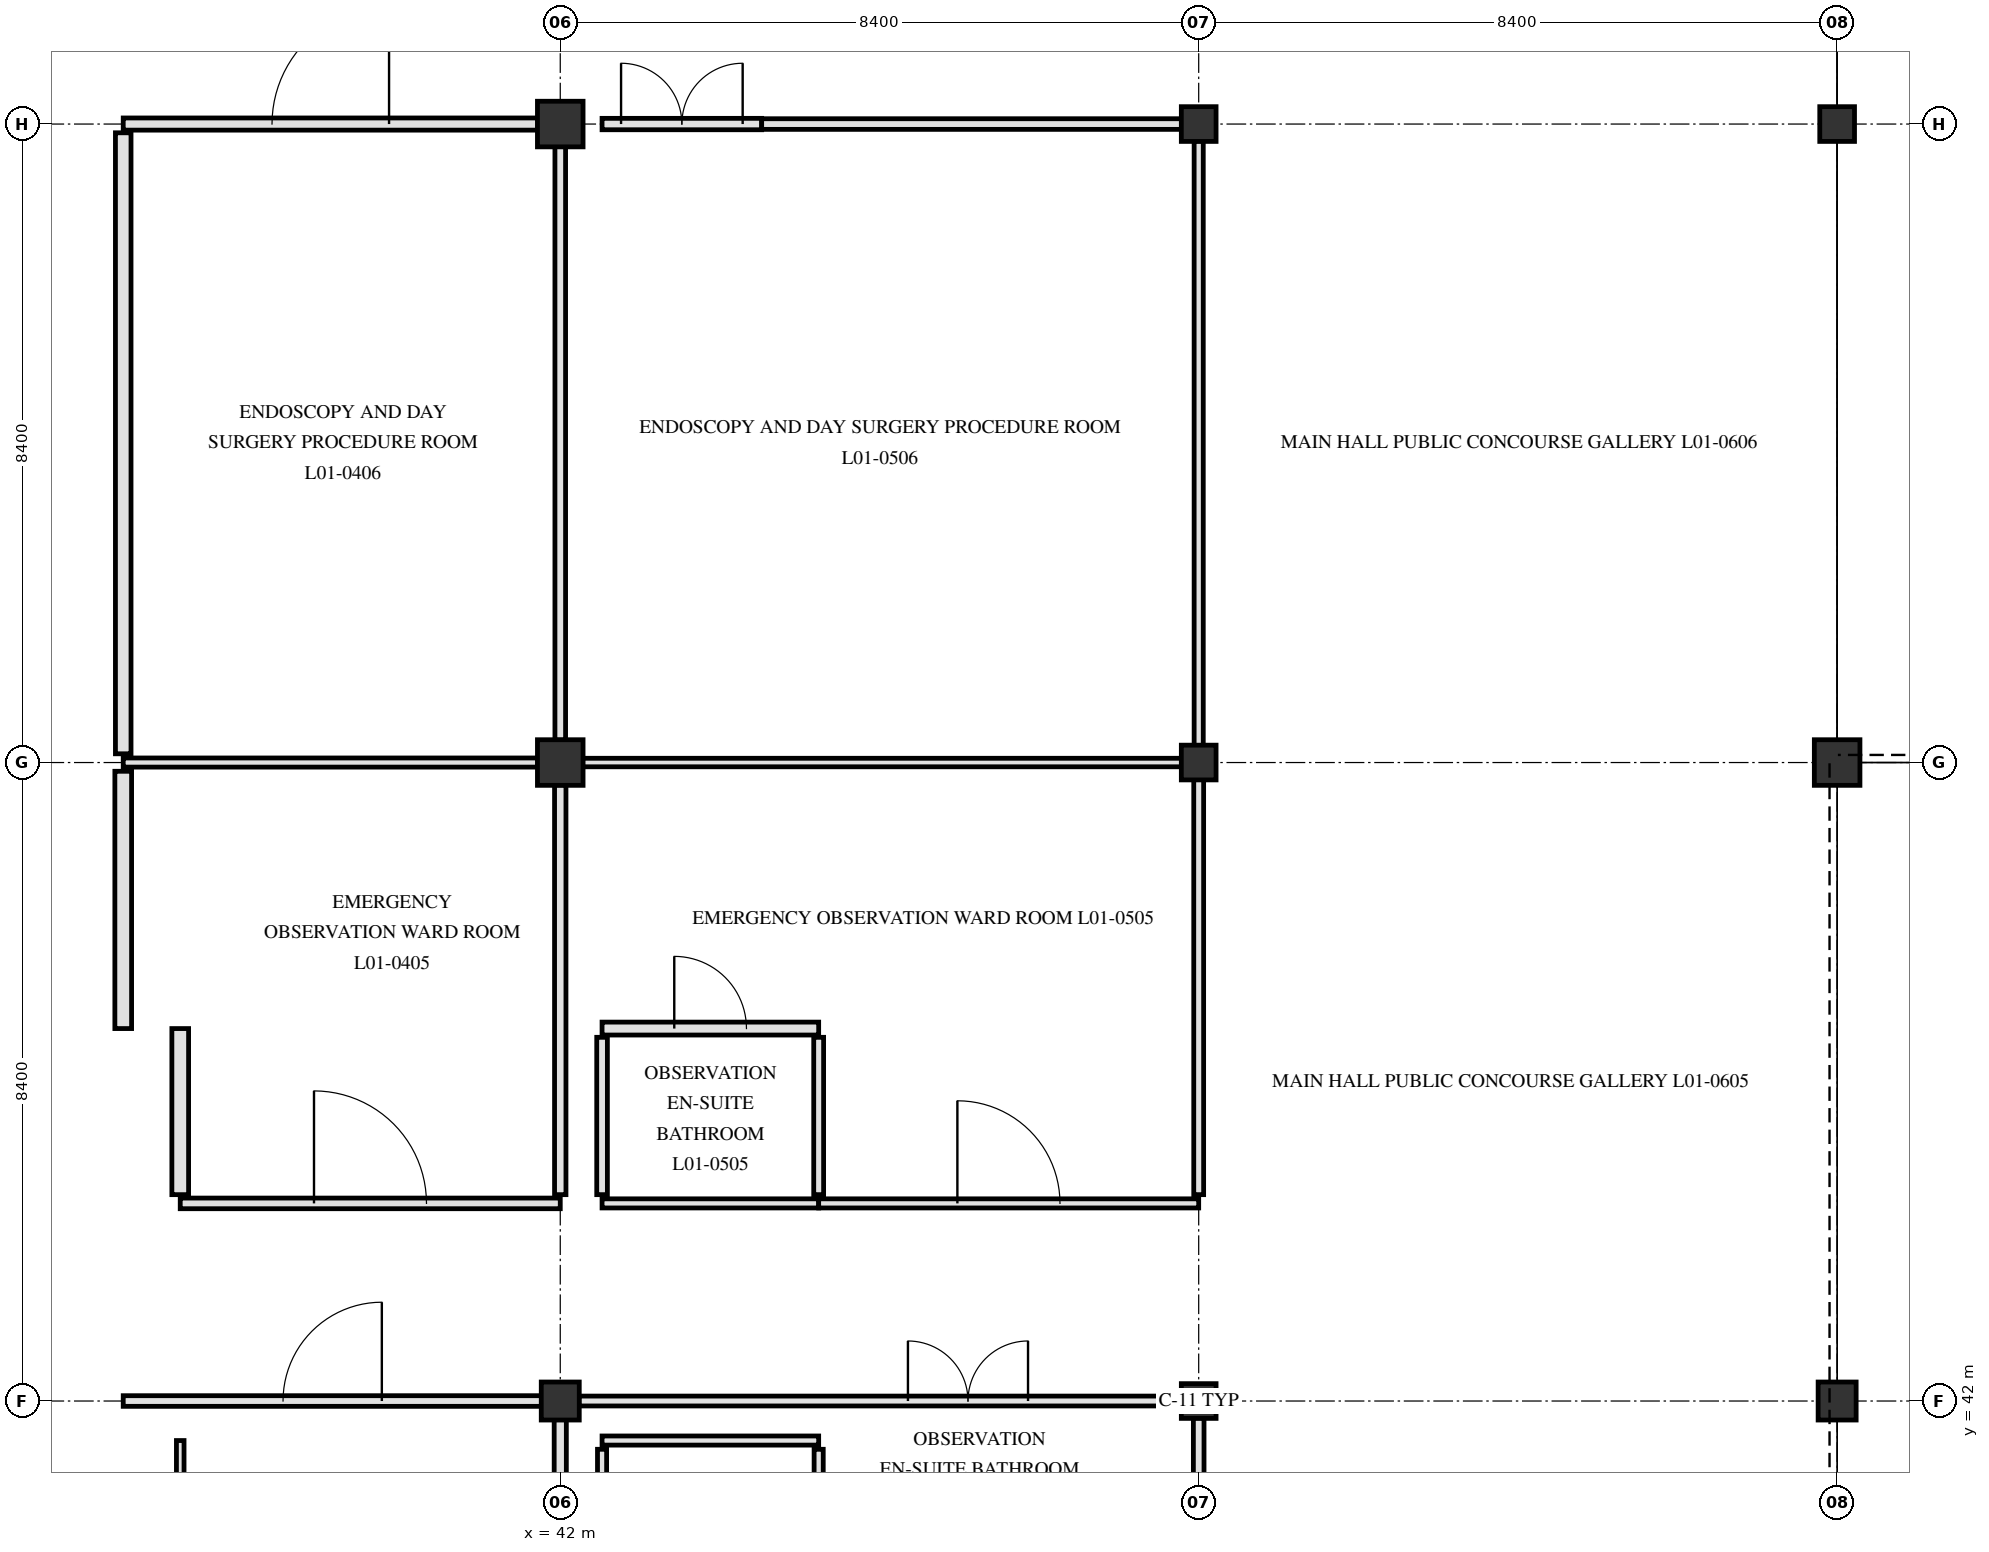
"""IFC4 building model, lengths in metres.
Left out: names, types, materials, properties, quantities, classifications, styles, units other than length and angle.
Written with IfcOpenShell. Run it as: python <this file> out.ifc"""

import sys

from ifc_helpers import new_model, si_unit, direction, frame, frame_2d, origin, origin_2d, place, context, subcontext, project, spatial, rectangle, hollow_circle, extrude, element, fill, save


model = new_model("IFC4")
c1 = context("Model", 3, precision=1e-05, world=origin(), true_north=direction((0.0, 1.0)))
c2 = subcontext(c1, "Body", "Model", "MODEL_VIEW")
j1 = project(units=[si_unit("LENGTHUNIT", "METRE"), si_unit("PLANEANGLEUNIT", "RADIAN")], contexts=[c1])
p1 = place(None, origin())
s1 = spatial("IfcSite", under=j1, at=p1, CompositionType="ELEMENT")
p2 = place(p1, origin())
s2 = spatial("IfcBuilding", under=s1, at=p2, CompositionType="ELEMENT")
p3 = place(p2, frame((0.0, 0.0, 4.8)))
s3 = spatial("IfcBuildingStorey", under=s2, at=p3, CompositionType="ELEMENT", Elevation=4.8)
p4 = place(p3, frame((42.0, 42.0, 0.0), z_axis=(0.0, 0.0, 1.0), x_axis=(1.0, 0.0, 0.0)))
e1 = element("IfcColumn", 1, at=p4, inside=s3, PredefinedType="COLUMN", context=c2, shape_type="SweptSolid", body=[
    extrude(rectangle(XDim=0.5, YDim=0.5, at=origin_2d()), origin(), (0.0, 0.0, 1.0), 4.5),
])
for number, where, z_axis, x_axis in (
    (2, (42.0, 50.4, 0.0), (0.0, 0.0, 1.0), (1.0, 0.0, 0.0)),
    (3, (42.0, 58.8, 0.0), (0.0, 0.0, 1.0), (1.0, 0.0, 0.0)),
):
    element("IfcColumn", number, at=place(p3, frame(where, z_axis=z_axis, x_axis=x_axis)), inside=s3, PredefinedType="COLUMN", context=c2, shape_type="SweptSolid", body=[
        extrude(rectangle(XDim=0.6, YDim=0.6, at=origin_2d()), origin(), (0.0, 0.0, 1.0), 4.5),
    ])
for number, where, z_axis, x_axis in (
    (4, (50.4, 42.0, 0.0), (0.0, 0.0, 1.0), (1.0, 0.0, 0.0)),
    (5, (50.4, 50.4, 0.0), (0.0, 0.0, 1.0), (1.0, 0.0, 0.0)),
    (6, (50.4, 58.8, 0.0), (0.0, 0.0, 1.0), (1.0, 0.0, 0.0)),
):
    element("IfcColumn", number, at=place(p3, frame(where, z_axis=z_axis, x_axis=x_axis)), inside=s3, PredefinedType="COLUMN", context=c2, shape_type="SweptSolid", body=[
        extrude(hollow_circle(Radius=0.229, WallThickness=0.02, at=origin_2d()), origin(), (0.0, 0.0, 1.0), 4.5),
    ])
p5 = place(p3, frame((58.8, 42.0, 0.0), z_axis=(0.0, 0.0, 1.0), x_axis=(1.0, 0.0, 0.0)))
e7 = element("IfcColumn", 7, at=p5, inside=s3, PredefinedType="COLUMN", context=c2, shape_type="SweptSolid", body=[
    extrude(rectangle(XDim=0.5, YDim=0.5, at=origin_2d()), origin(), (0.0, 0.0, 1.0), 4.5),
])
p6 = place(p3, frame((58.8, 50.4, 0.0), z_axis=(0.0, 0.0, 1.0), x_axis=(1.0, 0.0, 0.0)))
e8 = element("IfcColumn", 8, at=p6, inside=s3, PredefinedType="COLUMN", context=c2, shape_type="SweptSolid", body=[
    extrude(rectangle(XDim=0.6, YDim=0.6, at=origin_2d()), origin(), (0.0, 0.0, 1.0), 4.5),
])
p7 = place(p3, frame((58.8, 58.8, 0.0), z_axis=(0.0, 0.0, 1.0), x_axis=(1.0, 0.0, 0.0)))
e9 = element("IfcColumn", 9, at=p7, inside=s3, PredefinedType="COLUMN", context=c2, shape_type="SweptSolid", body=[
    extrude(hollow_circle(Radius=0.229, WallThickness=0.02, at=origin_2d()), origin(), (0.0, 0.0, 1.0), 4.5),
])
p8 = place(p3, frame((42.55, 41.48, 0.0), z_axis=(0.0, 0.0, 1.0), x_axis=(1.0, 0.0, 0.0)))
e10 = element("IfcWall", 10, at=p8, inside=s3, PredefinedType="PARTITIONING", context=c2, shape_type="SweptSolid", body=[
    extrude(rectangle(XDim=2.85, YDim=0.12, at=frame_2d((1.425, 0.0))), origin(), (0.0, 0.0, 1.0), 4.14),
])
p9 = place(p3, frame((36.25, 42.0, 0.0), z_axis=(0.0, 0.0, 1.0), x_axis=(1.0, 0.0, 0.0)))
e11 = element("IfcWall", 11, at=p9, inside=s3, PredefinedType="PARTITIONING", context=c2, shape_type="SweptSolid", body=[
    extrude(rectangle(XDim=5.505, YDim=0.14, at=frame_2d((2.752, 0.0))), origin(), (0.0, 0.0, 1.0), 3.54),
])
p10 = place(p9, frame((2.103, 0.0, 0.0)))
e12 = element("IfcOpeningElement", 12, at=p10, cuts=e11, PredefinedType="OPENING", context=c2, shape_type="SweptSolid", body=[
    extrude(rectangle(XDim=1.3, YDim=2.2, at=frame_2d((0.65, 1.1))), frame((0.0, 0.08, 0.0), z_axis=(0.0, -1.0, 0.0), x_axis=(1.0, 0.0, 0.0)), (0.0, 0.0, 1.0), 0.16),
])
p11 = place(p3, frame((42.245, 42.0, 0.0), z_axis=(0.0, 0.0, 1.0), x_axis=(1.0, 0.0, 0.0)))
e13 = element("IfcWall", 13, at=p11, inside=s3, PredefinedType="PARTITIONING", context=c2, shape_type="SweptSolid", body=[
    extrude(rectangle(XDim=7.931, YDim=0.13, at=frame_2d((3.966, 0.0))), origin(), (0.0, 0.0, 1.0), 3.54),
])
p12 = place(p11, frame((4.33, 0.0, 0.0)))
e14 = element("IfcOpeningElement", 14, at=p12, cuts=e13, PredefinedType="OPENING", context=c2, shape_type="SweptSolid", body=[
    extrude(rectangle(XDim=1.58, YDim=2.22, at=frame_2d((0.79, 1.11))), frame((0.0, 0.075, 0.0), z_axis=(0.0, -1.0, 0.0), x_axis=(1.0, 0.0, 0.0)), (0.0, 0.0, 1.0), 0.15),
])
p13 = place(p3, frame((37.0, 44.6, 0.0), z_axis=(0.0, 0.0, 1.0), x_axis=(1.0, 0.0, 0.0)))
e15 = element("IfcWall", 15, at=p13, inside=s3, PredefinedType="PARTITIONING", context=c2, shape_type="SweptSolid", body=[
    extrude(rectangle(XDim=5.0, YDim=0.14, at=frame_2d((2.5, 0.0))), origin(), (0.0, 0.0, 1.0), 3.59),
])
p14 = place(p13, frame((1.76, 0.0, 0.0)))
e16 = element("IfcOpeningElement", 16, at=p14, cuts=e15, PredefinedType="OPENING", context=c2, shape_type="SweptSolid", body=[
    extrude(rectangle(XDim=1.48, YDim=2.22, at=frame_2d((0.74, 1.11))), frame((0.0, 0.08, 0.0), z_axis=(0.0, -1.0, 0.0), x_axis=(1.0, 0.0, 0.0)), (0.0, 0.0, 1.0), 0.16),
])
p15 = place(p3, frame((42.55, 44.6, 0.0), z_axis=(0.0, 0.0, 1.0), x_axis=(1.0, 0.0, 0.0)))
e17 = element("IfcWall", 17, at=p15, inside=s3, PredefinedType="PARTITIONING", context=c2, shape_type="SweptSolid", body=[
    extrude(rectangle(XDim=2.85, YDim=0.12, at=frame_2d((1.425, 0.0))), origin(), (0.0, 0.0, 1.0), 4.14),
])
p16 = place(p3, frame((45.4, 44.6, 0.0), z_axis=(0.0, 0.0, 1.0), x_axis=(1.0, 0.0, 0.0)))
e18 = element("IfcWall", 18, at=p16, inside=s3, PredefinedType="PARTITIONING", context=c2, shape_type="SweptSolid", body=[
    extrude(rectangle(XDim=5.0, YDim=0.12, at=frame_2d((2.5, 0.0))), origin(), (0.0, 0.0, 1.0), 3.74),
])
p17 = place(p16, frame((1.825, 0.0, 0.0)))
e19 = element("IfcOpeningElement", 19, at=p17, cuts=e18, PredefinedType="OPENING", context=c2, shape_type="SweptSolid", body=[
    extrude(rectangle(XDim=1.35, YDim=2.2, at=frame_2d((0.675, 1.1))), frame((0.0, 0.07, 0.0), z_axis=(0.0, -1.0, 0.0), x_axis=(1.0, 0.0, 0.0)), (0.0, 0.0, 1.0), 0.14),
])
p18 = place(p3, frame((42.55, 46.9, 0.0), z_axis=(0.0, 0.0, 1.0), x_axis=(1.0, 0.0, 0.0)))
e20 = element("IfcWall", 20, at=p18, inside=s3, PredefinedType="PARTITIONING", context=c2, shape_type="SweptSolid", body=[
    extrude(rectangle(XDim=2.85, YDim=0.17, at=frame_2d((1.425, 0.0))), origin(), (0.0, 0.0, 1.0), 4.14),
])
p19 = place(p18, frame((0.95, 0.0, 0.0)))
e21 = element("IfcOpeningElement", 21, at=p19, cuts=e20, PredefinedType="OPENING", context=c2, shape_type="SweptSolid", body=[
    extrude(rectangle(XDim=0.95, YDim=2.1, at=frame_2d((0.475, 1.05))), frame((0.0, 0.095, 0.0), z_axis=(0.0, -1.0, 0.0), x_axis=(1.0, 0.0, 0.0)), (0.0, 0.0, 1.0), 0.19),
])
p20 = place(p3, frame((36.25, 50.4, 0.0), z_axis=(0.0, 0.0, 1.0), x_axis=(1.0, 0.0, 0.0)))
e22 = element("IfcWall", 22, at=p20, inside=s3, PredefinedType="PARTITIONING", context=c2, shape_type="SweptSolid", body=[
    extrude(rectangle(XDim=5.455, YDim=0.12, at=frame_2d((2.728, 0.0))), origin(), (0.0, 0.0, 1.0), 3.54),
])
p21 = place(p3, frame((42.295, 50.4, 0.0), z_axis=(0.0, 0.0, 1.0), x_axis=(1.0, 0.0, 0.0)))
e23 = element("IfcWall", 23, at=p21, inside=s3, PredefinedType="PARTITIONING", context=c2, shape_type="SweptSolid", body=[
    extrude(rectangle(XDim=7.882, YDim=0.112, at=frame_2d((3.941, 0.0))), origin(), (0.0, 0.0, 1.0), 3.54),
])
p22 = place(p3, frame((36.25, 58.8, 0.0), z_axis=(0.0, 0.0, 1.0), x_axis=(1.0, 0.0, 0.0)))
e24 = element("IfcWall", 24, at=p22, inside=s3, PredefinedType="PARTITIONING", context=c2, shape_type="SweptSolid", body=[
    extrude(rectangle(XDim=5.455, YDim=0.16, at=frame_2d((2.728, 0.0))), origin(), (0.0, 0.0, 1.0), 3.54),
])
p23 = place(p22, frame((1.958, 0.0, 0.0)))
e25 = element("IfcOpeningElement", 25, at=p23, cuts=e24, PredefinedType="OPENING", context=c2, shape_type="SweptSolid", body=[
    extrude(rectangle(XDim=1.54, YDim=2.24, at=frame_2d((0.77, 1.12))), frame((0.0, 0.09, 0.0), z_axis=(0.0, -1.0, 0.0), x_axis=(1.0, 0.0, 0.0)), (0.0, 0.0, 1.0), 0.18),
])
p24 = place(p3, frame((42.55, 58.8, 0.0), z_axis=(0.0, 0.0, 1.0), x_axis=(1.0, 0.0, 0.0)))
e26 = element("IfcWall", 26, at=p24, inside=s3, PredefinedType="PARTITIONING", context=c2, shape_type="SweptSolid", body=[
    extrude(rectangle(XDim=2.1, YDim=0.15, at=frame_2d((1.05, 0.0))), origin(), (0.0, 0.0, 1.0), 3.54),
])
p25 = place(p24, frame((0.25, 0.0, 0.0)))
e27 = element("IfcOpeningElement", 27, at=p25, cuts=e26, PredefinedType="OPENING", context=c2, shape_type="SweptSolid", body=[
    extrude(rectangle(XDim=1.6, YDim=2.25, at=frame_2d((0.8, 1.125))), frame((0.0, 0.085, 0.0), z_axis=(0.0, -1.0, 0.0), x_axis=(1.0, 0.0, 0.0)), (0.0, 0.0, 1.0), 0.17),
])
p26 = place(p3, frame((44.65, 58.8, 0.0), z_axis=(0.0, 0.0, 1.0), x_axis=(1.0, 0.0, 0.0)))
e28 = element("IfcWall", 28, at=p26, inside=s3, PredefinedType="PARTITIONING", context=c2, shape_type="SweptSolid", body=[
    extrude(rectangle(XDim=5.527, YDim=0.14, at=frame_2d((2.763, 0.0))), origin(), (0.0, 0.0, 1.0), 3.54),
])
p27 = place(p3, frame((36.25, 46.9, 0.0), z_axis=(0.0, 0.0, 1.0), x_axis=(0.0, 1.0, 0.0)))
e29 = element("IfcWall", 29, at=p27, inside=s3, PredefinedType="PARTITIONING", context=c2, shape_type="SweptSolid", body=[
    extrude(rectangle(XDim=3.385, YDim=0.22, at=frame_2d((1.692, 0.0))), origin(), (0.0, 0.0, 1.0), 3.54),
])
p28 = place(p3, frame((36.25, 50.515, 0.0), z_axis=(0.0, 0.0, 1.0), x_axis=(0.0, 1.0, 0.0)))
e30 = element("IfcWall", 30, at=p28, inside=s3, PredefinedType="PARTITIONING", context=c2, shape_type="SweptSolid", body=[
    extrude(rectangle(XDim=8.17, YDim=0.205, at=frame_2d((4.085, 0.0))), origin(), (0.0, 0.0, 1.0), 3.54),
])
p29 = place(p3, frame((37.0, 39.03, 0.0), z_axis=(0.0, 0.0, 1.0), x_axis=(0.0, 1.0, 0.0)))
e31 = element("IfcWall", 31, at=p29, inside=s3, PredefinedType="PARTITIONING", context=c2, shape_type="SweptSolid", body=[
    extrude(rectangle(XDim=2.45, YDim=0.1, at=frame_2d((1.225, 0.0))), origin(), (0.0, 0.0, 1.0), 4.14),
])
p30 = place(p3, frame((37.0, 44.715, 0.0), z_axis=(0.0, 0.0, 1.0), x_axis=(0.0, 1.0, 0.0)))
e32 = element("IfcWall", 32, at=p30, inside=s3, PredefinedType="PARTITIONING", context=c2, shape_type="SweptSolid", body=[
    extrude(rectangle(XDim=2.185, YDim=0.22, at=frame_2d((1.092, 0.0))), origin(), (0.0, 0.0, 1.0), 4.14),
])
p31 = place(p3, frame((42.0, 33.845, 0.0), z_axis=(0.0, 0.0, 1.0), x_axis=(0.0, 1.0, 0.0)))
e33 = element("IfcWall", 33, at=p31, inside=s3, PredefinedType="PARTITIONING", context=c2, shape_type="SweptSolid", body=[
    extrude(rectangle(XDim=7.91, YDim=0.16, at=frame_2d((3.955, 0.0))), origin(), (0.0, 0.0, 1.0), 3.59),
])
p32 = place(p3, frame((42.0, 44.715, 0.0), z_axis=(0.0, 0.0, 1.0), x_axis=(0.0, 1.0, 0.0)))
e34 = element("IfcWall", 34, at=p32, inside=s3, PredefinedType="PARTITIONING", context=c2, shape_type="SweptSolid", body=[
    extrude(rectangle(XDim=5.39, YDim=0.15, at=frame_2d((2.695, 0.0))), origin(), (0.0, 0.0, 1.0), 3.59),
])
p33 = place(p3, frame((42.0, 50.695, 0.0), z_axis=(0.0, 0.0, 1.0), x_axis=(0.0, 1.0, 0.0)))
e35 = element("IfcWall", 35, at=p33, inside=s3, PredefinedType="PARTITIONING", context=c2, shape_type="SweptSolid", body=[
    extrude(rectangle(XDim=7.81, YDim=0.14, at=frame_2d((3.905, 0.0))), origin(), (0.0, 0.0, 1.0), 3.59),
])
p34 = place(p3, frame((42.55, 39.145, 0.0), z_axis=(0.0, 0.0, 1.0), x_axis=(0.0, 1.0, 0.0)))
e36 = element("IfcWall", 36, at=p34, inside=s3, PredefinedType="PARTITIONING", context=c2, shape_type="SweptSolid", body=[
    extrude(rectangle(XDim=2.22, YDim=0.12, at=frame_2d((1.11, 0.0))), origin(), (0.0, 0.0, 1.0), 4.14),
])
p35 = place(p3, frame((42.55, 44.715, 0.0), z_axis=(0.0, 0.0, 1.0), x_axis=(0.0, 1.0, 0.0)))
e37 = element("IfcWall", 37, at=p35, inside=s3, PredefinedType="PARTITIONING", context=c2, shape_type="SweptSolid", body=[
    extrude(rectangle(XDim=2.07, YDim=0.14, at=frame_2d((1.035, 0.0))), origin(), (0.0, 0.0, 1.0), 4.14),
])
p36 = place(p3, frame((45.4, 39.145, 0.0), z_axis=(0.0, 0.0, 1.0), x_axis=(0.0, 1.0, 0.0)))
e38 = element("IfcWall", 38, at=p36, inside=s3, PredefinedType="PARTITIONING", context=c2, shape_type="SweptSolid", body=[
    extrude(rectangle(XDim=2.22, YDim=0.12, at=frame_2d((1.11, 0.0))), origin(), (0.0, 0.0, 1.0), 4.14),
])
p37 = place(p3, frame((45.4, 44.715, 0.0), z_axis=(0.0, 0.0, 1.0), x_axis=(0.0, 1.0, 0.0)))
e39 = element("IfcWall", 39, at=p37, inside=s3, PredefinedType="PARTITIONING", context=c2, shape_type="SweptSolid", body=[
    extrude(rectangle(XDim=2.07, YDim=0.13, at=frame_2d((1.035, 0.0))), origin(), (0.0, 0.0, 1.0), 4.14),
])
p38 = place(p3, frame((50.4, 33.823, 0.0), z_axis=(0.0, 0.0, 1.0), x_axis=(0.0, 1.0, 0.0)))
e40 = element("IfcWall", 40, at=p38, inside=s3, PredefinedType="PARTITIONING", context=c2, shape_type="SweptSolid", body=[
    extrude(rectangle(XDim=7.953, YDim=0.14, at=frame_2d((3.977, 0.0))), origin(), (0.0, 0.0, 1.0), 3.74),
])
p39 = place(p3, frame((50.4, 44.715, 0.0), z_axis=(0.0, 0.0, 1.0), x_axis=(0.0, 1.0, 0.0)))
e41 = element("IfcWall", 41, at=p39, inside=s3, PredefinedType="PARTITIONING", context=c2, shape_type="SweptSolid", body=[
    extrude(rectangle(XDim=5.461, YDim=0.13, at=frame_2d((2.731, 0.0))), origin(), (0.0, 0.0, 1.0), 3.74),
])
p40 = place(p3, frame((50.4, 50.624, 0.0), z_axis=(0.0, 0.0, 1.0), x_axis=(0.0, 1.0, 0.0)))
e42 = element("IfcWall", 42, at=p40, inside=s3, PredefinedType="PARTITIONING", context=c2, shape_type="SweptSolid", body=[
    extrude(rectangle(XDim=7.953, YDim=0.12, at=frame_2d((3.977, 0.0))), origin(), (0.0, 0.0, 1.0), 3.74),
])
p41 = place(p10, origin())
e43 = element("IfcDoor", 43, at=p41, inside=s3, OperationType="SINGLE_SWING_RIGHT", PredefinedType="DOOR", context=c2, shape_type="SweptSolid", body=[
    extrude(rectangle(XDim=1.3, YDim=2.2, at=frame_2d((0.65, 1.1))), frame((0.0, 0.025, 0.0), z_axis=(0.0, -1.0, 0.0), x_axis=(1.0, 0.0, 0.0)), (0.0, 0.0, 1.0), 0.05),
])
fill(e12, e43)
p42 = place(p14, origin())
e44 = element("IfcDoor", 44, at=p42, inside=s3, OperationType="SINGLE_SWING_LEFT", PredefinedType="DOOR", context=c2, shape_type="SweptSolid", body=[
    extrude(rectangle(XDim=1.48, YDim=2.22, at=frame_2d((0.74, 1.11))), frame((0.0, 0.025, 0.0), z_axis=(0.0, -1.0, 0.0), x_axis=(1.0, 0.0, 0.0)), (0.0, 0.0, 1.0), 0.05),
])
fill(e16, e44)
p43 = place(p23, origin())
e45 = element("IfcDoor", 45, at=p43, inside=s3, OperationType="SINGLE_SWING_RIGHT", PredefinedType="DOOR", context=c2, shape_type="SweptSolid", body=[
    extrude(rectangle(XDim=1.54, YDim=2.24, at=frame_2d((0.77, 1.12))), frame((0.0, 0.025, 0.0), z_axis=(0.0, -1.0, 0.0), x_axis=(1.0, 0.0, 0.0)), (0.0, 0.0, 1.0), 0.05),
])
fill(e25, e45)
p44 = place(p12, origin())
e46 = element("IfcDoor", 46, at=p44, inside=s3, OperationType="DOUBLE_SWING_LEFT", PredefinedType="DOOR", context=c2, shape_type="SweptSolid", body=[
    extrude(rectangle(XDim=1.58, YDim=2.22, at=frame_2d((0.79, 1.11))), frame((0.0, 0.025, 0.0), z_axis=(0.0, -1.0, 0.0), x_axis=(1.0, 0.0, 0.0)), (0.0, 0.0, 1.0), 0.05),
])
fill(e14, e46)
p45 = place(p17, origin())
e47 = element("IfcDoor", 47, at=p45, inside=s3, OperationType="SINGLE_SWING_LEFT", PredefinedType="DOOR", context=c2, shape_type="SweptSolid", body=[
    extrude(rectangle(XDim=1.35, YDim=2.2, at=frame_2d((0.675, 1.1))), frame((0.0, 0.025, 0.0), z_axis=(0.0, -1.0, 0.0), x_axis=(1.0, 0.0, 0.0)), (0.0, 0.0, 1.0), 0.05),
])
fill(e19, e47)
p46 = place(p19, origin())
e48 = element("IfcDoor", 48, at=p46, inside=s3, OperationType="SINGLE_SWING_LEFT", PredefinedType="DOOR", context=c2, shape_type="SweptSolid", body=[
    extrude(rectangle(XDim=0.95, YDim=2.1, at=frame_2d((0.475, 1.05))), frame((0.0, 0.025, 0.0), z_axis=(0.0, -1.0, 0.0), x_axis=(1.0, 0.0, 0.0)), (0.0, 0.0, 1.0), 0.05),
])
fill(e21, e48)
p47 = place(p25, origin())
e49 = element("IfcDoor", 49, at=p47, inside=s3, OperationType="DOUBLE_SWING_LEFT", PredefinedType="DOOR", context=c2, shape_type="SweptSolid", body=[
    extrude(rectangle(XDim=1.6, YDim=2.25, at=frame_2d((0.8, 1.125))), frame((0.0, 0.025, 0.0), z_axis=(0.0, -1.0, 0.0), x_axis=(1.0, 0.0, 0.0)), (0.0, 0.0, 1.0), 0.05),
])
fill(e27, e49)
save(model, sys.argv[1])
